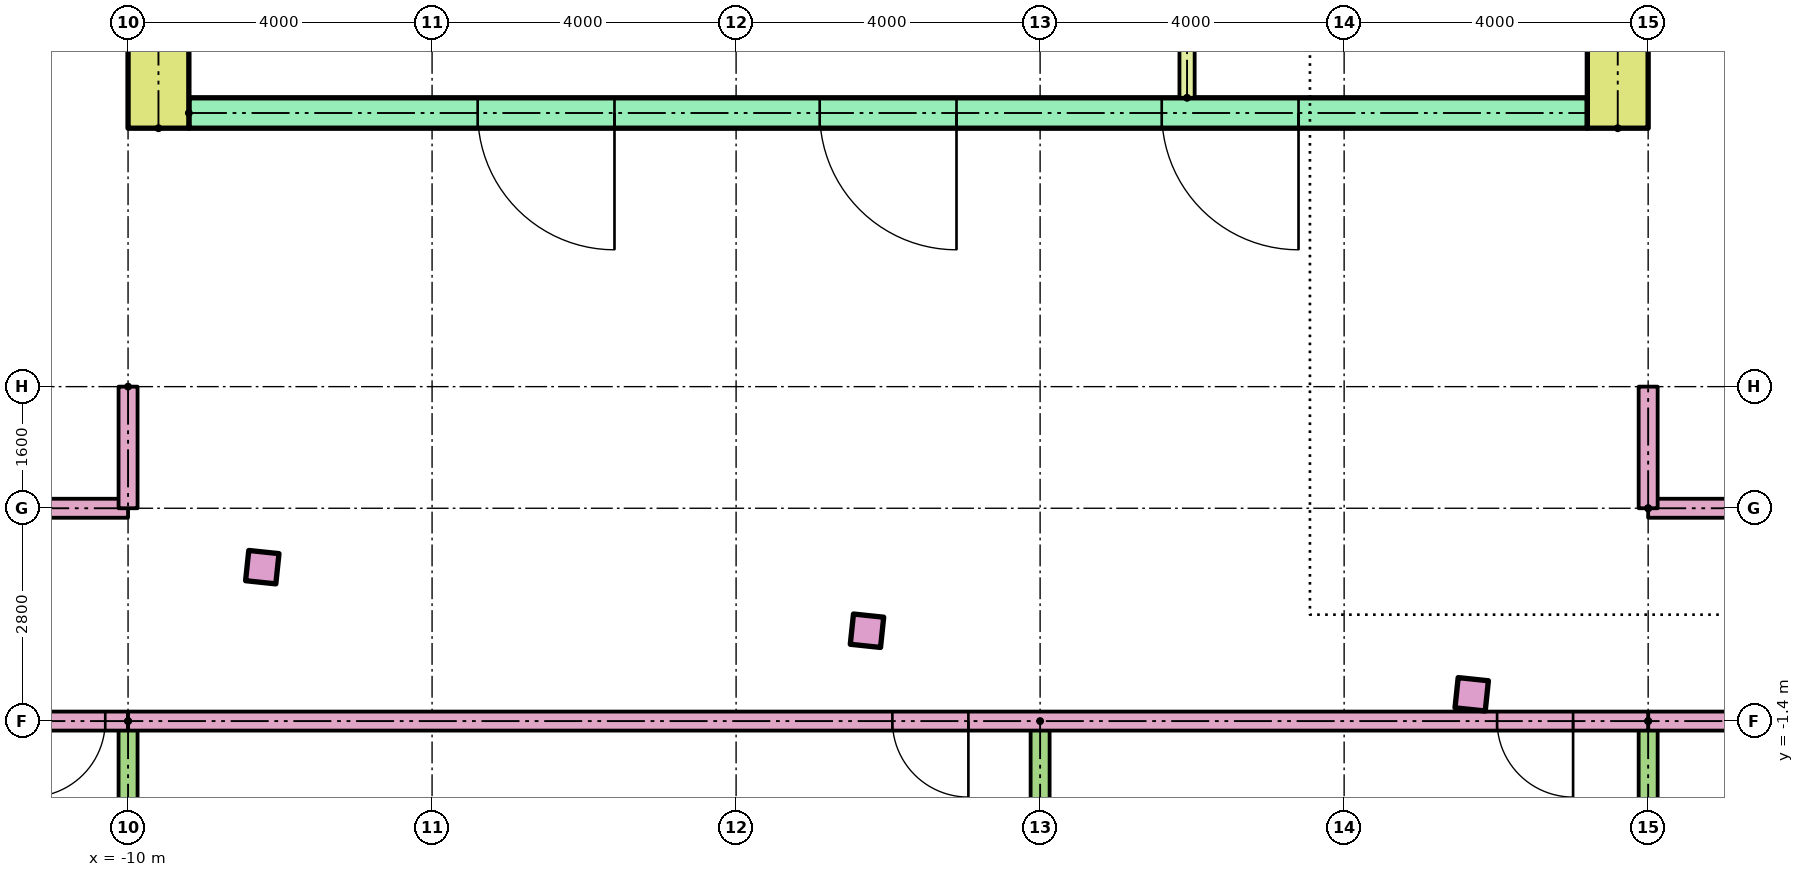
"""IFC4 building model, lengths in metres.
Left out: names, types, materials, properties, quantities, classifications, styles, units other than length and angle.
Written with IfcOpenShell. Run it as: python <this file> out.ifc"""

import sys

from ifc_helpers import new_model, si_unit, direction, frame, frame_2d, origin, origin_2d, place, context, subcontext, project, spatial, rectangle, extrude, element, fill, save


model = new_model("IFC4")
c1 = context("Model", 3, precision=1e-05, world=origin(), true_north=direction((0.0, 1.0)))
c2 = subcontext(c1, "Body", "Model", "MODEL_VIEW")
j1 = project(units=[si_unit("LENGTHUNIT", "METRE"), si_unit("PLANEANGLEUNIT", "RADIAN")], contexts=[c1])
p1 = place(None, origin())
s1 = spatial("IfcSite", under=j1, at=p1, CompositionType="ELEMENT")
p2 = place(p1, origin())
s2 = spatial("IfcBuilding", under=s1, at=p2, CompositionType="ELEMENT")
p3 = place(p2, frame((0.0, 0.0, 291.5)))
s3 = spatial("IfcBuildingStorey", under=s2, at=p3, CompositionType="ELEMENT", Elevation=291.5)
for number, where, z_axis, x_axis in (
    (1, (-8.234, 0.625, 0.0), (0.0, 0.0, 1.0), (0.995, -0.105, 0.0)),
    (2, (-0.278, -0.211, 0.0), (0.0, 0.0, 1.0), (0.995, -0.105, 0.0)),
    (3, (7.678, -1.048, 0.0), (0.0, 0.0, 1.0), (0.995, -0.105, 0.0)),
):
    element("IfcColumn", number, at=place(p3, frame(where, z_axis=z_axis, x_axis=x_axis)), inside=s3, PredefinedType="COLUMN", context=c2, shape_type="SweptSolid", body=[
        extrude(rectangle(XDim=0.4, YDim=0.4, at=origin_2d()), origin(), (0.0, 0.0, 1.0), 3.4),
    ])
for number, where, z_axis, x_axis in (
    (4, (-9.6, 6.4, 0.0), (0.0, 0.0, 1.0), (0.0, 1.0, 0.0)),
    (5, (9.6, 6.4, 0.0), (0.0, 0.0, 1.0), (0.0, 1.0, 0.0)),
):
    element("IfcWall", number, at=place(p3, frame(where, z_axis=z_axis, x_axis=x_axis)), inside=s3, PredefinedType="SHEAR", context=c2, shape_type="SweptSolid", body=[
        extrude(rectangle(XDim=13.6, YDim=0.8, at=frame_2d((6.8, 0.0))), origin(), (0.0, 0.0, 1.0), 3.12),
    ])
p4 = place(p3, frame((-9.2, 6.6, 0.0)))
e6 = element("IfcWall", 6, at=p4, inside=s3, PredefinedType="SHEAR", context=c2, shape_type="SweptSolid", body=[
    extrude(rectangle(XDim=18.4, YDim=0.4, at=frame_2d((9.2, 0.0))), origin(), (0.0, 0.0, 1.0), 3.12),
])
p5 = place(p4, frame((8.3, 0.0, 0.0)))
e7 = element("IfcOpeningElement", 7, at=p5, cuts=e6, PredefinedType="OPENING", context=c2, shape_type="SweptSolid", body=[
    extrude(rectangle(XDim=1.8, YDim=2.1, at=frame_2d((0.9, 1.05))), frame((0.0, 0.21, 0.0), z_axis=(0.0, -1.0, 0.0), x_axis=(1.0, 0.0, 0.0)), (0.0, 0.0, 1.0), 0.42),
])
p6 = place(p4, frame((3.8, 0.0, 0.0)))
e8 = element("IfcOpeningElement", 8, at=p6, cuts=e6, PredefinedType="OPENING", context=c2, shape_type="SweptSolid", body=[
    extrude(rectangle(XDim=1.8, YDim=2.1, at=frame_2d((0.9, 1.05))), frame((0.0, 0.21, 0.0), z_axis=(0.0, -1.0, 0.0), x_axis=(1.0, 0.0, 0.0)), (0.0, 0.0, 1.0), 0.42),
])
p7 = place(p4, frame((12.8, 0.0, 0.0)))
e9 = element("IfcOpeningElement", 9, at=p7, cuts=e6, PredefinedType="OPENING", context=c2, shape_type="SweptSolid", body=[
    extrude(rectangle(XDim=1.8, YDim=2.1, at=frame_2d((0.9, 1.05))), frame((0.0, 0.21, 0.0), z_axis=(0.0, -1.0, 0.0), x_axis=(1.0, 0.0, 0.0)), (0.0, 0.0, 1.0), 0.42),
])
p8 = place(p3, frame((3.933, 6.8, 0.0), z_axis=(0.0, 0.0, 1.0), x_axis=(0.0, 1.0, 0.0)))
e10 = element("IfcWall", 10, at=p8, inside=s3, PredefinedType="PARTITIONING", context=c2, shape_type="SweptSolid", body=[
    extrude(rectangle(XDim=3.3, YDim=0.2, at=frame_2d((1.65, 0.0))), origin(), (0.0, 0.0, 1.0), 3.12),
])
p9 = place(p8, frame((1.1, 0.0, 0.0)))
e11 = element("IfcOpeningElement", 11, at=p9, cuts=e10, PredefinedType="OPENING", context=c2, shape_type="SweptSolid", body=[
    extrude(rectangle(XDim=1.1, YDim=2.1, at=frame_2d((0.55, 1.05))), frame((0.0, 0.11, 0.0), z_axis=(0.0, -1.0, 0.0), x_axis=(1.0, 0.0, 0.0)), (0.0, 0.0, 1.0), 0.22),
])
p10 = place(p3, frame((-10.0, -1.4, 0.0), z_axis=(0.0, 0.0, 1.0), x_axis=(-1.0, 0.0, 0.0)))
e12 = element("IfcWall", 12, at=p10, inside=s3, PredefinedType="PARTITIONING", context=c2, shape_type="SweptSolid", body=[
    extrude(rectangle(XDim=12.0, YDim=0.25, at=frame_2d((6.0, 0.0))), origin(), (0.0, 0.0, 1.0), 2.6),
])
p11 = place(p10, frame((0.3, 0.0, 0.0)))
e13 = element("IfcOpeningElement", 13, at=p11, cuts=e12, PredefinedType="OPENING", context=c2, shape_type="SweptSolid", body=[
    extrude(rectangle(XDim=1.0, YDim=2.1, at=frame_2d((0.5, 1.05))), frame((0.0, 0.135, 0.0), z_axis=(0.0, -1.0, 0.0), x_axis=(1.0, 0.0, 0.0)), (0.0, 0.0, 1.0), 0.27),
])
p12 = place(p10, frame((5.5, 0.0, 0.0)))
e14 = element("IfcOpeningElement", 14, at=p12, cuts=e12, PredefinedType="OPENING", context=c2, shape_type="SweptSolid", body=[
    extrude(rectangle(XDim=1.0, YDim=2.1, at=frame_2d((0.5, 1.05))), frame((0.0, 0.135, 0.0), z_axis=(0.0, -1.0, 0.0), x_axis=(1.0, 0.0, 0.0)), (0.0, 0.0, 1.0), 0.27),
])
p13 = place(p3, frame((-10.0, -1.4, 0.0), z_axis=(0.0, 0.0, 1.0), x_axis=(0.0, -1.0, 0.0)))
e15 = element("IfcWall", 15, at=p13, inside=s3, PredefinedType="PARTITIONING", context=c2, shape_type="SweptSolid", body=[
    extrude(rectangle(XDim=12.491, YDim=0.25, at=frame_2d((6.246, 0.0))), origin(), (0.0, 0.0, 1.0), 2.6),
])
p14 = place(p3, frame((-22.0, 1.4, 0.0)))
e16 = element("IfcWall", 16, at=p14, inside=s3, PredefinedType="PARTITIONING", context=c2, shape_type="SweptSolid", body=[
    extrude(rectangle(XDim=12.0, YDim=0.25, at=frame_2d((6.0, 0.0))), origin(), (0.0, 0.0, 1.0), 2.6),
])
p15 = place(p14, frame((9.5, 0.0, 0.0)))
e17 = element("IfcOpeningElement", 17, at=p15, cuts=e16, PredefinedType="OPENING", context=c2, shape_type="SweptSolid", body=[
    extrude(rectangle(XDim=1.0, YDim=2.1, at=frame_2d((0.5, 1.05))), frame((0.0, 0.135, 0.0), z_axis=(0.0, -1.0, 0.0), x_axis=(1.0, 0.0, 0.0)), (0.0, 0.0, 1.0), 0.27),
])
p16 = place(p3, frame((25.0, -1.4, 0.0), z_axis=(0.0, 0.0, 1.0), x_axis=(-1.0, 0.0, 0.0)))
e18 = element("IfcWall", 18, at=p16, inside=s3, PredefinedType="PARTITIONING", context=c2, shape_type="SweptSolid", body=[
    extrude(rectangle(XDim=15.0, YDim=0.25, at=frame_2d((7.5, 0.0))), origin(), (0.0, 0.0, 1.0), 2.6),
])
p17 = place(p16, frame((12.5, 0.0, 0.0)))
e19 = element("IfcOpeningElement", 19, at=p17, cuts=e18, PredefinedType="OPENING", context=c2, shape_type="SweptSolid", body=[
    extrude(rectangle(XDim=1.0, YDim=2.1, at=frame_2d((0.5, 1.05))), frame((0.0, 0.135, 0.0), z_axis=(0.0, -1.0, 0.0), x_axis=(1.0, 0.0, 0.0)), (0.0, 0.0, 1.0), 0.27),
])
p18 = place(p16, frame((4.5, 0.0, 0.0)))
e20 = element("IfcOpeningElement", 20, at=p18, cuts=e18, PredefinedType="OPENING", context=c2, shape_type="SweptSolid", body=[
    extrude(rectangle(XDim=1.0, YDim=2.1, at=frame_2d((0.5, 1.05))), frame((0.0, 0.135, 0.0), z_axis=(0.0, -1.0, 0.0), x_axis=(1.0, 0.0, 0.0)), (0.0, 0.0, 1.0), 0.27),
])
p19 = place(p3, frame((10.0, -1.4, 0.0), z_axis=(0.0, 0.0, 1.0), x_axis=(0.0, -1.0, 0.0)))
e21 = element("IfcWall", 21, at=p19, inside=s3, PredefinedType="PARTITIONING", context=c2, shape_type="SweptSolid", body=[
    extrude(rectangle(XDim=14.593, YDim=0.25, at=frame_2d((7.297, 0.0))), origin(), (0.0, 0.0, 1.0), 2.6),
])
p20 = place(p3, frame((10.0, 1.4, 0.0)))
e22 = element("IfcWall", 22, at=p20, inside=s3, PredefinedType="PARTITIONING", context=c2, shape_type="SweptSolid", body=[
    extrude(rectangle(XDim=15.0, YDim=0.25, at=frame_2d((7.5, 0.0))), origin(), (0.0, 0.0, 1.0), 2.6),
])
p21 = place(p20, frame((1.5, 0.0, 0.0)))
e23 = element("IfcOpeningElement", 23, at=p21, cuts=e22, PredefinedType="OPENING", context=c2, shape_type="SweptSolid", body=[
    extrude(rectangle(XDim=1.0, YDim=2.1, at=frame_2d((0.5, 1.05))), frame((0.0, 0.135, 0.0), z_axis=(0.0, -1.0, 0.0), x_axis=(1.0, 0.0, 0.0)), (0.0, 0.0, 1.0), 0.27),
])
p22 = place(p20, frame((12.675, 0.0, 0.0)))
e24 = element("IfcOpeningElement", 24, at=p22, cuts=e22, PredefinedType="OPENING", context=c2, shape_type="SweptSolid", body=[
    extrude(rectangle(XDim=1.0, YDim=2.1, at=frame_2d((0.5, 1.05))), frame((0.0, 0.135, 0.0), z_axis=(0.0, -1.0, 0.0), x_axis=(1.0, 0.0, 0.0)), (0.0, 0.0, 1.0), 0.27),
])
p23 = place(p3, frame((2.0, -1.4, 0.0), z_axis=(0.0, 0.0, 1.0), x_axis=(0.0, -1.0, 0.0)))
e25 = element("IfcWall", 25, at=p23, inside=s3, PredefinedType="PARTITIONING", context=c2, shape_type="SweptSolid", body=[
    extrude(rectangle(XDim=13.752, YDim=0.25, at=frame_2d((6.876, 0.0))), origin(), (0.0, 0.0, 1.0), 2.6),
])
p24 = place(p3, frame((10.0, -1.4, 0.0), z_axis=(0.0, 0.0, 1.0), x_axis=(-1.0, 0.0, 0.0)))
e26 = element("IfcWall", 26, at=p24, inside=s3, PredefinedType="PARTITIONING", context=c2, shape_type="SweptSolid", body=[
    extrude(rectangle(XDim=20.0, YDim=0.25, at=frame_2d((10.0, 0.0))), origin(), (0.0, 0.0, 1.0), 2.6),
])
p25 = place(p24, frame((8.944, 0.0, 0.0)))
e27 = element("IfcOpeningElement", 27, at=p25, cuts=e26, PredefinedType="OPENING", context=c2, shape_type="SweptSolid", body=[
    extrude(rectangle(XDim=1.0, YDim=2.1, at=frame_2d((0.5, 1.05))), frame((0.0, 0.135, 0.0), z_axis=(0.0, -1.0, 0.0), x_axis=(1.0, 0.0, 0.0)), (0.0, 0.0, 1.0), 0.27),
])
p26 = place(p24, frame((0.988, 0.0, 0.0)))
e28 = element("IfcOpeningElement", 28, at=p26, cuts=e26, PredefinedType="OPENING", context=c2, shape_type="SweptSolid", body=[
    extrude(rectangle(XDim=1.0, YDim=2.1, at=frame_2d((0.5, 1.05))), frame((0.0, 0.135, 0.0), z_axis=(0.0, -1.0, 0.0), x_axis=(1.0, 0.0, 0.0)), (0.0, 0.0, 1.0), 0.27),
])
for number, where, z_axis, x_axis in (
    (29, (-10.0, 3.0, 0.0), (0.0, 0.0, 1.0), (0.0, -1.0, 0.0)),
    (30, (10.0, 1.4, 0.0), (0.0, 0.0, 1.0), (0.0, 1.0, 0.0)),
):
    element("IfcWall", number, at=place(p3, frame(where, z_axis=z_axis, x_axis=x_axis)), inside=s3, PredefinedType="PARTITIONING", context=c2, shape_type="SweptSolid", body=[
        extrude(rectangle(XDim=1.6, YDim=0.25, at=frame_2d((0.8, 0.0))), origin(), (0.0, 0.0, 1.0), 2.6),
    ])
p27 = place(p5, frame((1.8, 0.0, 0.0), z_axis=(0.0, 0.0, 1.0), x_axis=(-1.0, 0.0, 0.0)))
e31 = element("IfcDoor", 31, at=p27, inside=s3, OperationType="DOUBLE_DOOR_SINGLE_SWING", PredefinedType="DOOR", context=c2, shape_type="SweptSolid", body=[
    extrude(rectangle(XDim=1.8, YDim=2.1, at=frame_2d((0.9, 1.05))), frame((0.0, 0.025, 0.0), z_axis=(0.0, -1.0, 0.0), x_axis=(1.0, 0.0, 0.0)), (0.0, 0.0, 1.0), 0.05),
])
fill(e7, e31)
p28 = place(p6, frame((1.8, 0.0, 0.0), z_axis=(0.0, 0.0, 1.0), x_axis=(-1.0, 0.0, 0.0)))
e32 = element("IfcDoor", 32, at=p28, inside=s3, OperationType="DOUBLE_DOOR_SINGLE_SWING", PredefinedType="DOOR", context=c2, shape_type="SweptSolid", body=[
    extrude(rectangle(XDim=1.8, YDim=2.1, at=frame_2d((0.9, 1.05))), frame((0.0, 0.025, 0.0), z_axis=(0.0, -1.0, 0.0), x_axis=(1.0, 0.0, 0.0)), (0.0, 0.0, 1.0), 0.05),
])
fill(e8, e32)
p29 = place(p7, frame((1.8, 0.0, 0.0), z_axis=(0.0, 0.0, 1.0), x_axis=(-1.0, 0.0, 0.0)))
e33 = element("IfcDoor", 33, at=p29, inside=s3, OperationType="DOUBLE_DOOR_SINGLE_SWING", PredefinedType="DOOR", context=c2, shape_type="SweptSolid", body=[
    extrude(rectangle(XDim=1.8, YDim=2.1, at=frame_2d((0.9, 1.05))), frame((0.0, 0.025, 0.0), z_axis=(0.0, -1.0, 0.0), x_axis=(1.0, 0.0, 0.0)), (0.0, 0.0, 1.0), 0.05),
])
fill(e9, e33)
p30 = place(p11, origin())
e34 = element("IfcDoor", 34, at=p30, inside=s3, OperationType="SINGLE_SWING_RIGHT", PredefinedType="DOOR", context=c2, shape_type="SweptSolid", body=[
    extrude(rectangle(XDim=1.0, YDim=2.1, at=frame_2d((0.5, 1.05))), frame((0.0, 0.025, 0.0), z_axis=(0.0, -1.0, 0.0), x_axis=(1.0, 0.0, 0.0)), (0.0, 0.0, 1.0), 0.05),
])
fill(e13, e34)
p31 = place(p25, origin())
e35 = element("IfcDoor", 35, at=p31, inside=s3, OperationType="SINGLE_SWING_LEFT", PredefinedType="DOOR", context=c2, shape_type="SweptSolid", body=[
    extrude(rectangle(XDim=1.0, YDim=2.1, at=frame_2d((0.5, 1.05))), frame((0.0, 0.025, 0.0), z_axis=(0.0, -1.0, 0.0), x_axis=(1.0, 0.0, 0.0)), (0.0, 0.0, 1.0), 0.05),
])
fill(e27, e35)
p32 = place(p26, origin())
e36 = element("IfcDoor", 36, at=p32, inside=s3, OperationType="SINGLE_SWING_LEFT", PredefinedType="DOOR", context=c2, shape_type="SweptSolid", body=[
    extrude(rectangle(XDim=1.0, YDim=2.1, at=frame_2d((0.5, 1.05))), frame((0.0, 0.025, 0.0), z_axis=(0.0, -1.0, 0.0), x_axis=(1.0, 0.0, 0.0)), (0.0, 0.0, 1.0), 0.05),
])
fill(e28, e36)
save(model, sys.argv[1])
